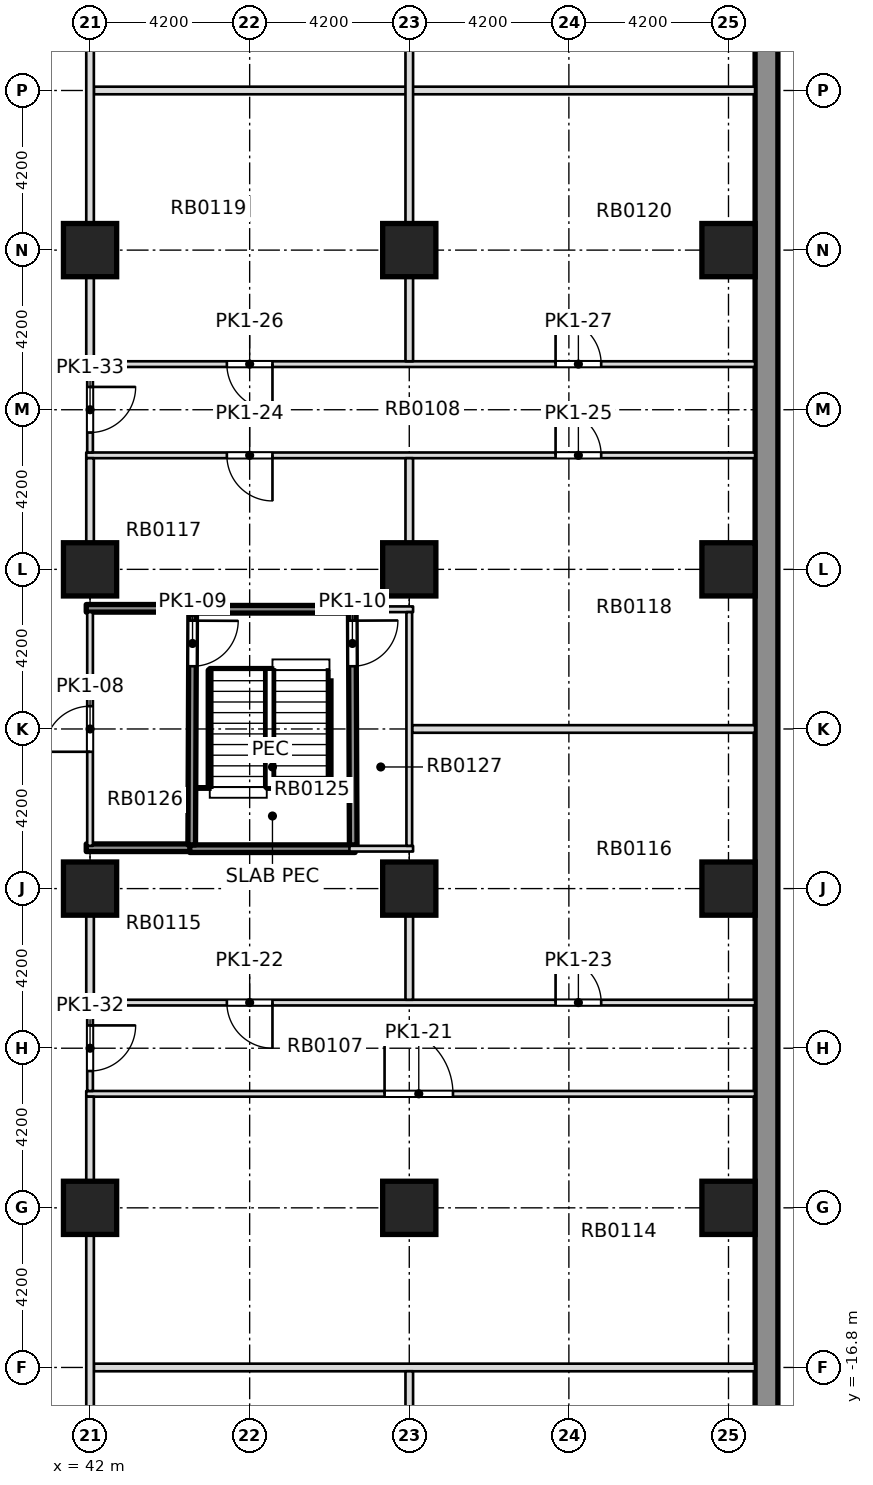
"""IFC4 building model, lengths in metres.
Left out: names, types, materials, properties, quantities, classifications, styles, units other than length and angle.
Written with IfcOpenShell. Run it as: python <this file> out.ifc"""

import sys

from ifc_helpers import new_model, si_unit, direction, frame, frame_2d, origin, origin_2d, place, context, subcontext, project, spatial, rectangle, extrude, element, fill, save


model = new_model("IFC4")
c1 = context("Model", 3, precision=1e-05, world=origin(), true_north=direction((0.0, 1.0)))
c2 = subcontext(c1, "Body", "Model", "MODEL_VIEW")
j1 = project(units=[si_unit("LENGTHUNIT", "METRE"), si_unit("PLANEANGLEUNIT", "RADIAN")], contexts=[c1])
p1 = place(None, origin())
s1 = spatial("IfcSite", under=j1, at=p1, CompositionType="ELEMENT")
p2 = place(p1, origin())
s2 = spatial("IfcBuilding", under=s1, at=p2, CompositionType="ELEMENT")
p3 = place(p2, frame((0.0, 0.0, -4.2)))
s3 = spatial("IfcBuildingStorey", under=s2, at=p3, CompositionType="ELEMENT", Elevation=-4.2)
p4 = place(p3, frame((59.8, -38.5, 0.0), z_axis=(0.0, 0.0, 1.0), x_axis=(0.0, 1.0, 0.0)))
e1 = element("IfcWall", 1, at=p4, inside=s3, PredefinedType="SOLIDWALL", context=c2, shape_type="SweptSolid", body=[
    extrude(rectangle(XDim=77.0, YDim=0.6, at=frame_2d((38.5, 0.0))), origin(), (0.0, 0.0, 1.0), 4.2),
])
for number, where, z_axis, x_axis in (
    (2, (42.0, -12.6, 0.0), (0.0, 0.0, 1.0), (1.0, 0.0, 0.0)),
    (3, (50.4, -12.6, 0.0), (0.0, 0.0, 1.0), (1.0, 0.0, 0.0)),
    (4, (58.8, -12.6, 0.0), (0.0, 0.0, 1.0), (1.0, 0.0, 0.0)),
    (5, (42.0, -4.2, 0.0), (0.0, 0.0, 1.0), (1.0, 0.0, 0.0)),
    (6, (50.4, -4.2, 0.0), (0.0, 0.0, 1.0), (1.0, 0.0, 0.0)),
    (7, (58.8, -4.2, 0.0), (0.0, 0.0, 1.0), (1.0, 0.0, 0.0)),
    (8, (42.0, 4.2, 0.0), (0.0, 0.0, 1.0), (1.0, 0.0, 0.0)),
    (9, (50.4, 4.2, 0.0), (0.0, 0.0, 1.0), (1.0, 0.0, 0.0)),
    (10, (58.8, 4.2, 0.0), (0.0, 0.0, 1.0), (1.0, 0.0, 0.0)),
    (11, (42.0, 12.6, 0.0), (0.0, 0.0, 1.0), (1.0, 0.0, 0.0)),
    (12, (50.4, 12.6, 0.0), (0.0, 0.0, 1.0), (1.0, 0.0, 0.0)),
    (13, (58.8, 12.6, 0.0), (0.0, 0.0, 1.0), (1.0, 0.0, 0.0)),
):
    element("IfcColumn", number, at=place(p3, frame(where, z_axis=z_axis, x_axis=x_axis)), inside=s3, PredefinedType="COLUMN", context=c2, shape_type="SweptSolid", body=[
        extrude(rectangle(XDim=1.4, YDim=1.4, at=origin_2d()), origin(), (0.0, 0.0, 1.0), 4.2),
    ])
p5 = place(p3, frame((42.1, -16.8, 0.0), z_axis=(0.0, 0.0, 1.0), x_axis=(1.0, 0.0, 0.0)))
e14 = element("IfcWall", 14, at=p5, inside=s3, PredefinedType="PARTITIONING", context=c2, shape_type="SweptSolid", body=[
    extrude(rectangle(XDim=17.399, YDim=0.2, at=frame_2d((8.699, 0.0))), origin(), (0.0, 0.0, 1.0), 3.75),
])
p6 = place(p3, frame((41.9, -9.6, 0.0), z_axis=(0.0, 0.0, 1.0), x_axis=(1.0, 0.0, 0.0)))
e15 = element("IfcWall", 15, at=p6, inside=s3, PredefinedType="PARTITIONING", context=c2, shape_type="SweptSolid", body=[
    extrude(rectangle(XDim=17.599, YDim=0.15, at=frame_2d((8.8, 0.0))), origin(), (0.0, 0.0, 1.0), 3.75),
])
p7 = place(p6, frame((7.85, 0.0, 0.0)))
e16 = element("IfcOpeningElement", 16, at=p7, cuts=e15, PredefinedType="OPENING", context=c2, shape_type="SweptSolid", body=[
    extrude(rectangle(XDim=1.8, YDim=2.1, at=frame_2d((0.9, 1.05))), frame((0.0, 0.085, 0.0), z_axis=(0.0, -1.0, 0.0), x_axis=(1.0, 0.0, 0.0)), (0.0, 0.0, 1.0), 0.17),
])
p8 = place(p3, frame((41.9, -7.2, 0.0), z_axis=(0.0, 0.0, 1.0), x_axis=(1.0, 0.0, 0.0)))
e17 = element("IfcWall", 17, at=p8, inside=s3, PredefinedType="PARTITIONING", context=c2, shape_type="SweptSolid", body=[
    extrude(rectangle(XDim=17.599, YDim=0.15, at=frame_2d((8.8, 0.0))), origin(), (0.0, 0.0, 1.0), 3.75),
])
p9 = place(p8, frame((3.7, 0.0, 0.0)))
e18 = element("IfcOpeningElement", 18, at=p9, cuts=e17, PredefinedType="OPENING", context=c2, shape_type="SweptSolid", body=[
    extrude(rectangle(XDim=1.2, YDim=2.1, at=frame_2d((0.6, 1.05))), frame((0.0, 0.085, 0.0), z_axis=(0.0, -1.0, 0.0), x_axis=(1.0, 0.0, 0.0)), (0.0, 0.0, 1.0), 0.17),
])
p10 = place(p8, frame((12.35, 0.0, 0.0)))
e19 = element("IfcOpeningElement", 19, at=p10, cuts=e17, PredefinedType="OPENING", context=c2, shape_type="SweptSolid", body=[
    extrude(rectangle(XDim=1.2, YDim=2.1, at=frame_2d((0.6, 1.05))), frame((0.0, 0.085, 0.0), z_axis=(0.0, -1.0, 0.0), x_axis=(1.0, 0.0, 0.0)), (0.0, 0.0, 1.0), 0.17),
])
p11 = place(p3, frame((41.9, -3.125, 0.0), z_axis=(0.0, 0.0, 1.0), x_axis=(1.0, 0.0, 0.0)))
e20 = element("IfcWall", 20, at=p11, inside=s3, PredefinedType="SOLIDWALL", context=c2, shape_type="SweptSolid", body=[
    extrude(rectangle(XDim=2.875, YDim=0.2, at=frame_2d((1.438, 0.0))), origin(), (0.0, 0.0, 1.0), 3.75),
])
p12 = place(p3, frame((44.625, -3.15, 0.0), z_axis=(0.0, 0.0, 1.0), x_axis=(1.0, 0.0, 0.0)))
e21 = element("IfcWall", 21, at=p12, inside=s3, PredefinedType="SOLIDWALL", context=c2, shape_type="SweptSolid", body=[
    extrude(rectangle(XDim=4.35, YDim=0.2, at=frame_2d((2.175, 0.0))), origin(), (0.0, 0.0, 1.0), 3.75),
])
p13 = place(p3, frame((48.825, -3.15, 0.0), z_axis=(0.0, 0.0, 1.0), x_axis=(1.0, 0.0, 0.0)))
e22 = element("IfcWall", 22, at=p13, inside=s3, PredefinedType="PARTITIONING", context=c2, shape_type="SweptSolid", body=[
    extrude(rectangle(XDim=1.675, YDim=0.15, at=frame_2d((0.837, 0.0))), origin(), (0.0, 0.0, 1.0), 3.75),
])
p14 = place(p3, frame((50.475, 0.0, 0.0), z_axis=(0.0, 0.0, 1.0), x_axis=(1.0, 0.0, 0.0)))
e23 = element("IfcWall", 23, at=p14, inside=s3, PredefinedType="PARTITIONING", context=c2, shape_type="SweptSolid", body=[
    extrude(rectangle(XDim=9.024, YDim=0.2, at=frame_2d((4.512, 0.0))), origin(), (0.0, 0.0, 1.0), 3.75),
])
p15 = place(p3, frame((41.9, 3.175, 0.0), z_axis=(0.0, 0.0, 1.0), x_axis=(1.0, 0.0, 0.0)))
e24 = element("IfcWall", 24, at=p15, inside=s3, PredefinedType="SOLIDWALL", context=c2, shape_type="SweptSolid", body=[
    extrude(rectangle(XDim=2.875, YDim=0.2, at=frame_2d((1.438, 0.0))), origin(), (0.0, 0.0, 1.0), 3.75),
])
p16 = place(p3, frame((44.625, 3.15, 0.0), z_axis=(0.0, 0.0, 1.0), x_axis=(1.0, 0.0, 0.0)))
e25 = element("IfcWall", 25, at=p16, inside=s3, PredefinedType="SOLIDWALL", context=c2, shape_type="SweptSolid", body=[
    extrude(rectangle(XDim=4.35, YDim=0.2, at=frame_2d((2.175, 0.0))), origin(), (0.0, 0.0, 1.0), 3.75),
])
p17 = place(p3, frame((48.825, 3.15, 0.0), z_axis=(0.0, 0.0, 1.0), x_axis=(1.0, 0.0, 0.0)))
e26 = element("IfcWall", 26, at=p17, inside=s3, PredefinedType="PARTITIONING", context=c2, shape_type="SweptSolid", body=[
    extrude(rectangle(XDim=1.675, YDim=0.15, at=frame_2d((0.837, 0.0))), origin(), (0.0, 0.0, 1.0), 3.75),
])
p18 = place(p3, frame((41.9, 7.2, 0.0), z_axis=(0.0, 0.0, 1.0), x_axis=(1.0, 0.0, 0.0)))
e27 = element("IfcWall", 27, at=p18, inside=s3, PredefinedType="PARTITIONING", context=c2, shape_type="SweptSolid", body=[
    extrude(rectangle(XDim=17.599, YDim=0.15, at=frame_2d((8.8, 0.0))), origin(), (0.0, 0.0, 1.0), 3.75),
])
p19 = place(p18, frame((3.7, 0.0, 0.0)))
e28 = element("IfcOpeningElement", 28, at=p19, cuts=e27, PredefinedType="OPENING", context=c2, shape_type="SweptSolid", body=[
    extrude(rectangle(XDim=1.2, YDim=2.1, at=frame_2d((0.6, 1.05))), frame((0.0, 0.085, 0.0), z_axis=(0.0, -1.0, 0.0), x_axis=(1.0, 0.0, 0.0)), (0.0, 0.0, 1.0), 0.17),
])
p20 = place(p18, frame((12.35, 0.0, 0.0)))
e29 = element("IfcOpeningElement", 29, at=p20, cuts=e27, PredefinedType="OPENING", context=c2, shape_type="SweptSolid", body=[
    extrude(rectangle(XDim=1.2, YDim=2.1, at=frame_2d((0.6, 1.05))), frame((0.0, 0.085, 0.0), z_axis=(0.0, -1.0, 0.0), x_axis=(1.0, 0.0, 0.0)), (0.0, 0.0, 1.0), 0.17),
])
p21 = place(p3, frame((41.9, 9.6, 0.0), z_axis=(0.0, 0.0, 1.0), x_axis=(1.0, 0.0, 0.0)))
e30 = element("IfcWall", 30, at=p21, inside=s3, PredefinedType="PARTITIONING", context=c2, shape_type="SweptSolid", body=[
    extrude(rectangle(XDim=17.599, YDim=0.15, at=frame_2d((8.8, 0.0))), origin(), (0.0, 0.0, 1.0), 3.75),
])
p22 = place(p21, frame((3.7, 0.0, 0.0)))
e31 = element("IfcOpeningElement", 31, at=p22, cuts=e30, PredefinedType="OPENING", context=c2, shape_type="SweptSolid", body=[
    extrude(rectangle(XDim=1.2, YDim=2.1, at=frame_2d((0.6, 1.05))), frame((0.0, 0.085, 0.0), z_axis=(0.0, -1.0, 0.0), x_axis=(1.0, 0.0, 0.0)), (0.0, 0.0, 1.0), 0.17),
])
p23 = place(p21, frame((12.35, 0.0, 0.0)))
e32 = element("IfcOpeningElement", 32, at=p23, cuts=e30, PredefinedType="OPENING", context=c2, shape_type="SweptSolid", body=[
    extrude(rectangle(XDim=1.2, YDim=2.1, at=frame_2d((0.6, 1.05))), frame((0.0, 0.085, 0.0), z_axis=(0.0, -1.0, 0.0), x_axis=(1.0, 0.0, 0.0)), (0.0, 0.0, 1.0), 0.17),
])
p24 = place(p3, frame((42.1, 16.8, 0.0), z_axis=(0.0, 0.0, 1.0), x_axis=(1.0, 0.0, 0.0)))
e33 = element("IfcWall", 33, at=p24, inside=s3, PredefinedType="PARTITIONING", context=c2, shape_type="SweptSolid", body=[
    extrude(rectangle(XDim=17.399, YDim=0.2, at=frame_2d((8.699, 0.0))), origin(), (0.0, 0.0, 1.0), 3.75),
])
p25 = place(p3, frame((42.0, -20.3, 0.0), z_axis=(0.0, 0.0, 1.0), x_axis=(0.0, 1.0, 0.0)))
e34 = element("IfcWall", 34, at=p25, inside=s3, PredefinedType="PARTITIONING", context=c2, shape_type="SweptSolid", body=[
    extrude(rectangle(XDim=7.0, YDim=0.2, at=frame_2d((3.5, 0.0))), origin(), (0.0, 0.0, 1.0), 3.75),
])
p26 = place(p3, frame((42.0, -11.9, 0.0), z_axis=(0.0, 0.0, 1.0), x_axis=(0.0, 1.0, 0.0)))
e35 = element("IfcWall", 35, at=p26, inside=s3, PredefinedType="PARTITIONING", context=c2, shape_type="SweptSolid", body=[
    extrude(rectangle(XDim=2.225, YDim=0.2, at=frame_2d((1.112, 0.0))), origin(), (0.0, 0.0, 1.0), 3.75),
])
p27 = place(p3, frame((42.0, -9.525, 0.0), z_axis=(0.0, 0.0, 1.0), x_axis=(0.0, 1.0, 0.0)))
e36 = element("IfcWall", 36, at=p27, inside=s3, PredefinedType="PARTITIONING", context=c2, shape_type="SweptSolid", body=[
    extrude(rectangle(XDim=2.25, YDim=0.15, at=frame_2d((1.125, 0.0))), origin(), (0.0, 0.0, 1.0), 3.75),
])
p28 = place(p27, frame((0.525, 0.0, 0.0)))
e37 = element("IfcOpeningElement", 37, at=p28, cuts=e36, PredefinedType="OPENING", context=c2, shape_type="SweptSolid", body=[
    extrude(rectangle(XDim=1.2, YDim=2.1, at=frame_2d((0.6, 1.05))), frame((0.0, 0.085, 0.0), z_axis=(0.0, -1.0, 0.0), x_axis=(1.0, 0.0, 0.0)), (0.0, 0.0, 1.0), 0.17),
])
p29 = place(p3, frame((42.0, -7.125, 0.0), z_axis=(0.0, 0.0, 1.0), x_axis=(0.0, 1.0, 0.0)))
e38 = element("IfcWall", 38, at=p29, inside=s3, PredefinedType="PARTITIONING", context=c2, shape_type="SweptSolid", body=[
    extrude(rectangle(XDim=2.225, YDim=0.2, at=frame_2d((1.113, 0.0))), origin(), (0.0, 0.0, 1.0), 3.75),
])
p30 = place(p3, frame((42.0, -3.075, 0.0), z_axis=(0.0, 0.0, 1.0), x_axis=(0.0, 1.0, 0.0)))
e39 = element("IfcWall", 39, at=p30, inside=s3, PredefinedType="PARTITIONING", context=c2, shape_type="SweptSolid", body=[
    extrude(rectangle(XDim=6.15, YDim=0.15, at=frame_2d((3.075, 0.0))), origin(), (0.0, 0.0, 1.0), 3.75),
])
p31 = place(p30, frame((2.475, 0.0, 0.0)))
e40 = element("IfcOpeningElement", 40, at=p31, cuts=e39, PredefinedType="OPENING", context=c2, shape_type="SweptSolid", body=[
    extrude(rectangle(XDim=1.2, YDim=2.1, at=frame_2d((0.6, 1.05))), frame((0.0, 0.085, 0.0), z_axis=(0.0, -1.0, 0.0), x_axis=(1.0, 0.0, 0.0)), (0.0, 0.0, 1.0), 0.17),
])
p32 = place(p3, frame((42.0, 4.9, 0.0), z_axis=(0.0, 0.0, 1.0), x_axis=(0.0, 1.0, 0.0)))
e41 = element("IfcWall", 41, at=p32, inside=s3, PredefinedType="PARTITIONING", context=c2, shape_type="SweptSolid", body=[
    extrude(rectangle(XDim=2.225, YDim=0.2, at=frame_2d((1.113, 0.0))), origin(), (0.0, 0.0, 1.0), 3.75),
])
p33 = place(p3, frame((42.0, 7.275, 0.0), z_axis=(0.0, 0.0, 1.0), x_axis=(0.0, 1.0, 0.0)))
e42 = element("IfcWall", 42, at=p33, inside=s3, PredefinedType="PARTITIONING", context=c2, shape_type="SweptSolid", body=[
    extrude(rectangle(XDim=2.25, YDim=0.15, at=frame_2d((1.125, 0.0))), origin(), (0.0, 0.0, 1.0), 3.75),
])
p34 = place(p33, frame((0.525, 0.0, 0.0)))
e43 = element("IfcOpeningElement", 43, at=p34, cuts=e42, PredefinedType="OPENING", context=c2, shape_type="SweptSolid", body=[
    extrude(rectangle(XDim=1.2, YDim=2.1, at=frame_2d((0.6, 1.05))), frame((0.0, 0.085, 0.0), z_axis=(0.0, -1.0, 0.0), x_axis=(1.0, 0.0, 0.0)), (0.0, 0.0, 1.0), 0.17),
])
p35 = place(p3, frame((42.0, 9.675, 0.0), z_axis=(0.0, 0.0, 1.0), x_axis=(0.0, 1.0, 0.0)))
e44 = element("IfcWall", 44, at=p35, inside=s3, PredefinedType="PARTITIONING", context=c2, shape_type="SweptSolid", body=[
    extrude(rectangle(XDim=2.225, YDim=0.2, at=frame_2d((1.112, 0.0))), origin(), (0.0, 0.0, 1.0), 3.75),
])
p36 = place(p3, frame((42.0, 13.3, 0.0), z_axis=(0.0, 0.0, 1.0), x_axis=(0.0, 1.0, 0.0)))
e45 = element("IfcWall", 45, at=p36, inside=s3, PredefinedType="PARTITIONING", context=c2, shape_type="SweptSolid", body=[
    extrude(rectangle(XDim=7.0, YDim=0.2, at=frame_2d((3.5, 0.0))), origin(), (0.0, 0.0, 1.0), 3.75),
])
p37 = place(p3, frame((44.675, -3.05, 0.0), z_axis=(0.0, 0.0, 1.0), x_axis=(0.004098985015, 0.999991599126, 0.0)))
e46 = element("IfcWall", 46, at=p37, inside=s3, PredefinedType="SOLIDWALL", context=c2, shape_type="SweptSolid", body=[
    extrude(rectangle(XDim=6.075, YDim=0.2, at=frame_2d((3.038, 0.0))), origin(), (0.0, 0.0, 1.0), 3.75),
])
p38 = place(p37, frame((4.7, 0.0, 0.0)))
e47 = element("IfcOpeningElement", 47, at=p38, cuts=e46, PredefinedType="OPENING", context=c2, shape_type="SweptSolid", body=[
    extrude(rectangle(XDim=1.2, YDim=2.1, at=frame_2d((0.6, 1.05))), frame((0.0, 0.11, 0.0), z_axis=(0.0, -1.0, 0.0), x_axis=(1.0, 0.0, 0.0)), (0.0, 0.0, 1.0), 0.22),
])
p39 = place(p3, frame((48.925, -3.05, 0.0), z_axis=(0.0, 0.0, 1.0), x_axis=(-0.004065655173, 0.99999173519, 0.0)))
e48 = element("IfcWall", 48, at=p39, inside=s3, PredefinedType="SOLIDWALL", context=c2, shape_type="SweptSolid", body=[
    extrude(rectangle(XDim=6.125, YDim=0.2, at=frame_2d((3.062, 0.0))), origin(), (0.0, 0.0, 1.0), 3.75),
])
p40 = place(p39, frame((4.7, 0.0, 0.0)))
e49 = element("IfcOpeningElement", 49, at=p40, cuts=e48, PredefinedType="OPENING", context=c2, shape_type="SweptSolid", body=[
    extrude(rectangle(XDim=1.2, YDim=2.1, at=frame_2d((0.6, 1.05))), frame((0.0, 0.11, 0.0), z_axis=(0.0, -1.0, 0.0), x_axis=(1.0, 0.0, 0.0)), (0.0, 0.0, 1.0), 0.22),
])
p41 = place(p3, frame((50.4, -20.3, 0.0), z_axis=(0.0, 0.0, 1.0), x_axis=(0.0, 1.0, 0.0)))
e50 = element("IfcWall", 50, at=p41, inside=s3, PredefinedType="PARTITIONING", context=c2, shape_type="SweptSolid", body=[
    extrude(rectangle(XDim=3.4, YDim=0.2, at=frame_2d((1.7, 0.0))), origin(), (0.0, 0.0, 1.0), 3.75),
])
p42 = place(p3, frame((50.4, -7.125, 0.0), z_axis=(0.0, 0.0, 1.0), x_axis=(0.0, 1.0, 0.0)))
e51 = element("IfcWall", 51, at=p42, inside=s3, PredefinedType="PARTITIONING", context=c2, shape_type="SweptSolid", body=[
    extrude(rectangle(XDim=2.225, YDim=0.2, at=frame_2d((1.113, 0.0))), origin(), (0.0, 0.0, 1.0), 3.75),
])
p43 = place(p3, frame((50.4, -3.075, 0.0), z_axis=(0.0, 0.0, 1.0), x_axis=(0.0, 1.0, 0.0)))
e52 = element("IfcWall", 52, at=p43, inside=s3, PredefinedType="PARTITIONING", context=c2, shape_type="SweptSolid", body=[
    extrude(rectangle(XDim=6.15, YDim=0.15, at=frame_2d((3.075, 0.0))), origin(), (0.0, 0.0, 1.0), 3.75),
])
p44 = place(p3, frame((50.4, 4.9, 0.0), z_axis=(0.0, 0.0, 1.0), x_axis=(0.0, 1.0, 0.0)))
e53 = element("IfcWall", 53, at=p44, inside=s3, PredefinedType="PARTITIONING", context=c2, shape_type="SweptSolid", body=[
    extrude(rectangle(XDim=2.225, YDim=0.2, at=frame_2d((1.113, 0.0))), origin(), (0.0, 0.0, 1.0), 3.75),
])
p45 = place(p3, frame((50.4, 9.675, 0.0), z_axis=(0.0, 0.0, 1.0), x_axis=(0.0, 1.0, 0.0)))
e54 = element("IfcWall", 54, at=p45, inside=s3, PredefinedType="PARTITIONING", context=c2, shape_type="SweptSolid", body=[
    extrude(rectangle(XDim=2.225, YDim=0.2, at=frame_2d((1.112, 0.0))), origin(), (0.0, 0.0, 1.0), 3.75),
])
p46 = place(p3, frame((50.4, 13.3, 0.0), z_axis=(0.0, 0.0, 1.0), x_axis=(0.0, 1.0, 0.0)))
e55 = element("IfcWall", 55, at=p46, inside=s3, PredefinedType="PARTITIONING", context=c2, shape_type="SweptSolid", body=[
    extrude(rectangle(XDim=7.0, YDim=0.2, at=frame_2d((3.5, 0.0))), origin(), (0.0, 0.0, 1.0), 3.75),
])
p47 = place(p31, origin())
e56 = element("IfcDoor", 56, at=p47, inside=s3, OperationType="DOUBLE_DOOR_SINGLE_SWING", PredefinedType="DOOR", context=c2, shape_type="SweptSolid", body=[
    extrude(rectangle(XDim=1.2, YDim=2.1, at=frame_2d((0.6, 1.05))), frame((0.0, 0.025, 0.0), z_axis=(0.0, -1.0, 0.0), x_axis=(1.0, 0.0, 0.0)), (0.0, 0.0, 1.0), 0.05),
])
fill(e40, e56)
p48 = place(p38, origin())
e57 = element("IfcDoor", 57, at=p48, inside=s3, OperationType="DOUBLE_DOOR_SINGLE_SWING", PredefinedType="DOOR", context=c2, shape_type="SweptSolid", body=[
    extrude(rectangle(XDim=1.2, YDim=2.1, at=frame_2d((0.6, 1.05))), frame((0.0, 0.025, 0.0), z_axis=(0.0, -1.0, 0.0), x_axis=(1.0, 0.0, 0.0)), (0.0, 0.0, 1.0), 0.05),
])
fill(e47, e57)
p49 = place(p40, origin())
e58 = element("IfcDoor", 58, at=p49, inside=s3, OperationType="DOUBLE_DOOR_SINGLE_SWING", PredefinedType="DOOR", context=c2, shape_type="SweptSolid", body=[
    extrude(rectangle(XDim=1.2, YDim=2.1, at=frame_2d((0.6, 1.05))), frame((0.0, 0.025, 0.0), z_axis=(0.0, -1.0, 0.0), x_axis=(1.0, 0.0, 0.0)), (0.0, 0.0, 1.0), 0.05),
])
fill(e49, e58)
p50 = place(p7, origin())
e59 = element("IfcDoor", 59, at=p50, inside=s3, OperationType="DOUBLE_DOOR_SINGLE_SWING", PredefinedType="DOOR", context=c2, shape_type="SweptSolid", body=[
    extrude(rectangle(XDim=1.8, YDim=2.1, at=frame_2d((0.9, 1.05))), frame((0.0, 0.025, 0.0), z_axis=(0.0, -1.0, 0.0), x_axis=(1.0, 0.0, 0.0)), (0.0, 0.0, 1.0), 0.05),
])
fill(e16, e59)
p51 = place(p9, origin())
e60 = element("IfcDoor", 60, at=p51, inside=s3, OperationType="SINGLE_SWING_LEFT", PredefinedType="DOOR", context=c2, shape_type="SweptSolid", body=[
    extrude(rectangle(XDim=1.2, YDim=2.1, at=frame_2d((0.6, 1.05))), frame((0.0, 0.025, 0.0), z_axis=(0.0, -1.0, 0.0), x_axis=(1.0, 0.0, 0.0)), (0.0, 0.0, 1.0), 0.05),
])
fill(e18, e60)
p52 = place(p10, origin())
e61 = element("IfcDoor", 61, at=p52, inside=s3, OperationType="SINGLE_SWING_RIGHT", PredefinedType="DOOR", context=c2, shape_type="SweptSolid", body=[
    extrude(rectangle(XDim=1.2, YDim=2.1, at=frame_2d((0.6, 1.05))), frame((0.0, 0.025, 0.0), z_axis=(0.0, -1.0, 0.0), x_axis=(1.0, 0.0, 0.0)), (0.0, 0.0, 1.0), 0.05),
])
fill(e19, e61)
p53 = place(p19, origin())
e62 = element("IfcDoor", 62, at=p53, inside=s3, OperationType="SINGLE_SWING_LEFT", PredefinedType="DOOR", context=c2, shape_type="SweptSolid", body=[
    extrude(rectangle(XDim=1.2, YDim=2.1, at=frame_2d((0.6, 1.05))), frame((0.0, 0.025, 0.0), z_axis=(0.0, -1.0, 0.0), x_axis=(1.0, 0.0, 0.0)), (0.0, 0.0, 1.0), 0.05),
])
fill(e28, e62)
p54 = place(p20, origin())
e63 = element("IfcDoor", 63, at=p54, inside=s3, OperationType="SINGLE_SWING_RIGHT", PredefinedType="DOOR", context=c2, shape_type="SweptSolid", body=[
    extrude(rectangle(XDim=1.2, YDim=2.1, at=frame_2d((0.6, 1.05))), frame((0.0, 0.025, 0.0), z_axis=(0.0, -1.0, 0.0), x_axis=(1.0, 0.0, 0.0)), (0.0, 0.0, 1.0), 0.05),
])
fill(e29, e63)
p55 = place(p22, origin())
e64 = element("IfcDoor", 64, at=p55, inside=s3, OperationType="SINGLE_SWING_LEFT", PredefinedType="DOOR", context=c2, shape_type="SweptSolid", body=[
    extrude(rectangle(XDim=1.2, YDim=2.1, at=frame_2d((0.6, 1.05))), frame((0.0, 0.025, 0.0), z_axis=(0.0, -1.0, 0.0), x_axis=(1.0, 0.0, 0.0)), (0.0, 0.0, 1.0), 0.05),
])
fill(e31, e64)
p56 = place(p23, origin())
e65 = element("IfcDoor", 65, at=p56, inside=s3, OperationType="SINGLE_SWING_RIGHT", PredefinedType="DOOR", context=c2, shape_type="SweptSolid", body=[
    extrude(rectangle(XDim=1.2, YDim=2.1, at=frame_2d((0.6, 1.05))), frame((0.0, 0.025, 0.0), z_axis=(0.0, -1.0, 0.0), x_axis=(1.0, 0.0, 0.0)), (0.0, 0.0, 1.0), 0.05),
])
fill(e32, e65)
p57 = place(p28, origin())
e66 = element("IfcDoor", 66, at=p57, inside=s3, OperationType="SINGLE_SWING_LEFT", PredefinedType="DOOR", context=c2, shape_type="SweptSolid", body=[
    extrude(rectangle(XDim=1.2, YDim=2.1, at=frame_2d((0.6, 1.05))), frame((0.0, 0.025, 0.0), z_axis=(0.0, -1.0, 0.0), x_axis=(1.0, 0.0, 0.0)), (0.0, 0.0, 1.0), 0.05),
])
fill(e37, e66)
p58 = place(p34, origin())
e67 = element("IfcDoor", 67, at=p58, inside=s3, OperationType="SINGLE_SWING_RIGHT", PredefinedType="DOOR", context=c2, shape_type="SweptSolid", body=[
    extrude(rectangle(XDim=1.2, YDim=2.1, at=frame_2d((0.6, 1.05))), frame((0.0, 0.025, 0.0), z_axis=(0.0, -1.0, 0.0), x_axis=(1.0, 0.0, 0.0)), (0.0, 0.0, 1.0), 0.05),
])
fill(e43, e67)
save(model, sys.argv[1])
